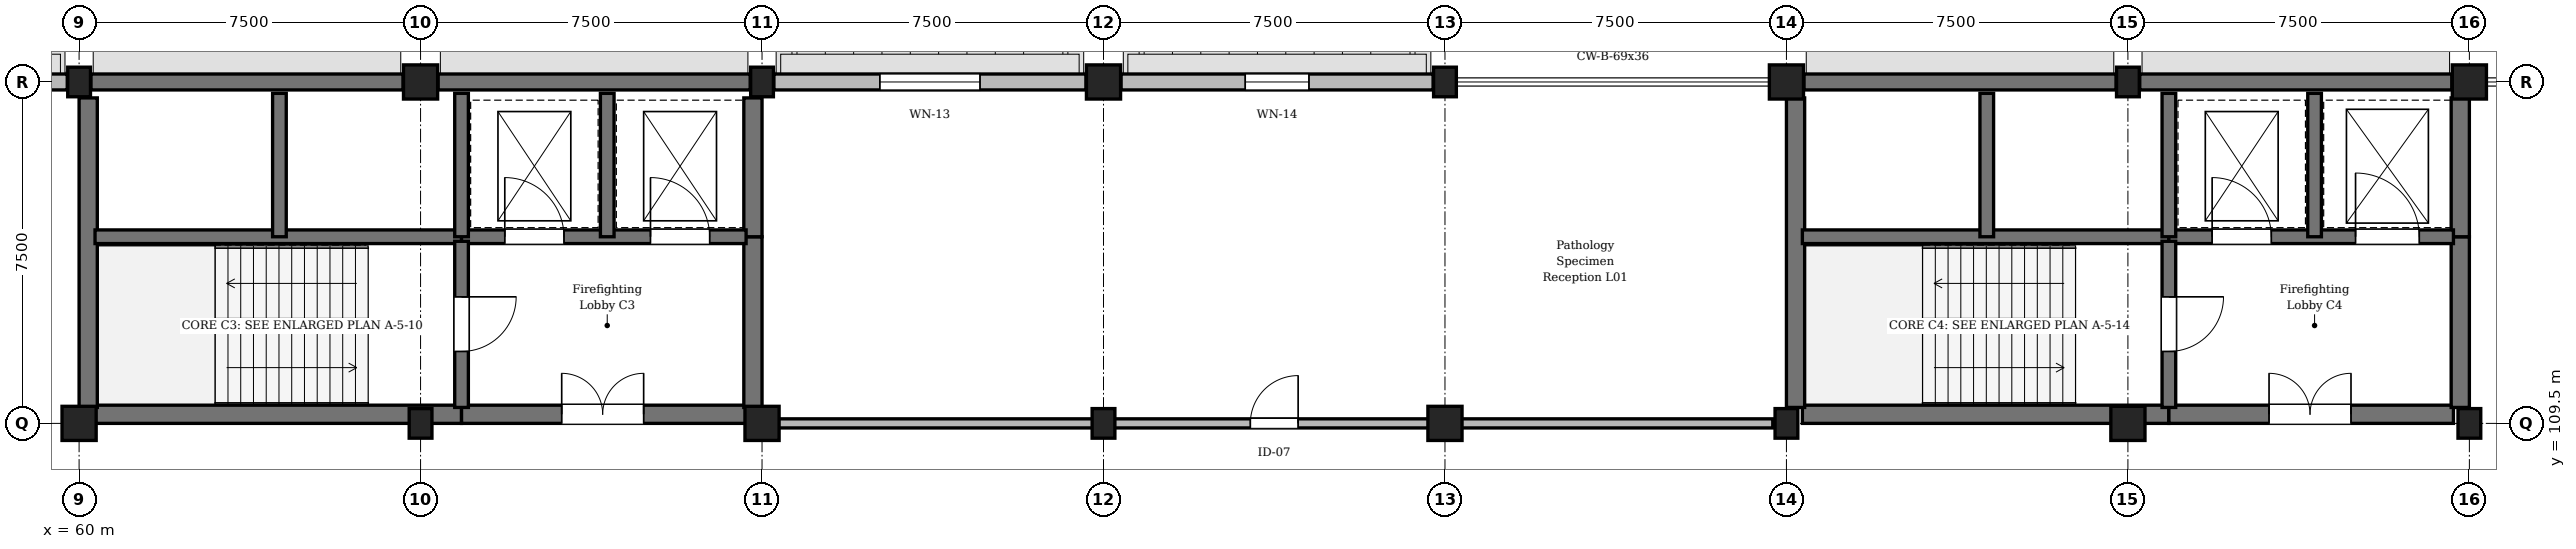
"""IFC4 building model, lengths in metres.
Left out: names, types, materials, properties, quantities, classifications, styles, units other than length and angle.
Written with IfcOpenShell. Run it as: python <this file> out.ifc"""

import sys

from ifc_helpers import new_model, si_unit, direction, frame, frame_2d, origin, origin_2d, place, context, subcontext, project, spatial, rectangle, extrude, element, fill, save


model = new_model("IFC4")
c1 = context("Model", 3, precision=1e-05, world=origin(), true_north=direction((0.0, 1.0)))
c2 = subcontext(c1, "Body", "Model", "MODEL_VIEW")
j1 = project(units=[si_unit("LENGTHUNIT", "METRE"), si_unit("PLANEANGLEUNIT", "RADIAN")], contexts=[c1])
p1 = place(None, origin())
s1 = spatial("IfcSite", under=j1, at=p1, CompositionType="ELEMENT")
p2 = place(p1, origin())
s2 = spatial("IfcBuilding", under=s1, at=p2, CompositionType="ELEMENT")
p3 = place(p2, frame((0.0, 0.0, 4.8)))
s3 = spatial("IfcBuildingStorey", under=s2, at=p3, CompositionType="ELEMENT", Elevation=4.8)
p4 = place(p3, frame((60.0, 109.5, 0.0), z_axis=(0.0, 0.0, 1.0), x_axis=(1.0, 0.0, 0.0)))
e1 = element("IfcColumn", 1, at=p4, inside=s3, PredefinedType="COLUMN", context=c2, shape_type="SweptSolid", body=[
    extrude(rectangle(XDim=0.75, YDim=0.75, at=origin_2d()), origin(), (0.0, 0.0, 1.0), 4.5),
])
for number, where, z_axis, x_axis in (
    (2, (60.0, 117.0, 0.0), (0.0, 0.0, 1.0), (1.0, 0.0, 0.0)),
    (3, (67.5, 109.5, 0.0), (0.0, 0.0, 1.0), (1.0, 0.0, 0.0)),
):
    element("IfcColumn", number, at=place(p3, frame(where, z_axis=z_axis, x_axis=x_axis)), inside=s3, PredefinedType="COLUMN", context=c2, shape_type="SweptSolid", body=[
        extrude(rectangle(XDim=0.5, YDim=0.65, at=origin_2d()), origin(), (0.0, 0.0, 1.0), 4.5),
    ])
for number, where, z_axis, x_axis in (
    (4, (67.5, 117.0, 0.0), (0.0, 0.0, 1.0), (1.0, 0.0, 0.0)),
    (5, (75.0, 109.5, 0.0), (0.0, 0.0, 1.0), (1.0, 0.0, 0.0)),
):
    element("IfcColumn", number, at=place(p3, frame(where, z_axis=z_axis, x_axis=x_axis)), inside=s3, PredefinedType="COLUMN", context=c2, shape_type="SweptSolid", body=[
        extrude(rectangle(XDim=0.75, YDim=0.75, at=origin_2d()), origin(), (0.0, 0.0, 1.0), 4.5),
    ])
for number, where, z_axis, x_axis in (
    (6, (75.0, 117.0, 0.0), (0.0, 0.0, 1.0), (1.0, 0.0, 0.0)),
    (7, (82.5, 109.5, 0.0), (0.0, 0.0, 1.0), (1.0, 0.0, 0.0)),
):
    element("IfcColumn", number, at=place(p3, frame(where, z_axis=z_axis, x_axis=x_axis)), inside=s3, PredefinedType="COLUMN", context=c2, shape_type="SweptSolid", body=[
        extrude(rectangle(XDim=0.5, YDim=0.65, at=origin_2d()), origin(), (0.0, 0.0, 1.0), 4.5),
    ])
for number, where, z_axis, x_axis in (
    (8, (82.5, 117.0, 0.0), (0.0, 0.0, 1.0), (1.0, 0.0, 0.0)),
    (9, (90.0, 109.5, 0.0), (0.0, 0.0, 1.0), (1.0, 0.0, 0.0)),
):
    element("IfcColumn", number, at=place(p3, frame(where, z_axis=z_axis, x_axis=x_axis)), inside=s3, PredefinedType="COLUMN", context=c2, shape_type="SweptSolid", body=[
        extrude(rectangle(XDim=0.75, YDim=0.75, at=origin_2d()), origin(), (0.0, 0.0, 1.0), 4.5),
    ])
for number, where, z_axis, x_axis in (
    (10, (90.0, 117.0, 0.0), (0.0, 0.0, 1.0), (1.0, 0.0, 0.0)),
    (11, (97.5, 109.5, 0.0), (0.0, 0.0, 1.0), (1.0, 0.0, 0.0)),
):
    element("IfcColumn", number, at=place(p3, frame(where, z_axis=z_axis, x_axis=x_axis)), inside=s3, PredefinedType="COLUMN", context=c2, shape_type="SweptSolid", body=[
        extrude(rectangle(XDim=0.5, YDim=0.65, at=origin_2d()), origin(), (0.0, 0.0, 1.0), 4.5),
    ])
for number, where, z_axis, x_axis in (
    (12, (97.5, 117.0, 0.0), (0.0, 0.0, 1.0), (1.0, 0.0, 0.0)),
    (13, (105.0, 109.5, 0.0), (0.0, 0.0, 1.0), (1.0, 0.0, 0.0)),
):
    element("IfcColumn", number, at=place(p3, frame(where, z_axis=z_axis, x_axis=x_axis)), inside=s3, PredefinedType="COLUMN", context=c2, shape_type="SweptSolid", body=[
        extrude(rectangle(XDim=0.75, YDim=0.75, at=origin_2d()), origin(), (0.0, 0.0, 1.0), 4.5),
    ])
for number, where, z_axis, x_axis in (
    (14, (105.0, 117.0, 0.0), (0.0, 0.0, 1.0), (1.0, 0.0, 0.0)),
    (15, (112.5, 109.5, 0.0), (0.0, 0.0, 1.0), (1.0, 0.0, 0.0)),
):
    element("IfcColumn", number, at=place(p3, frame(where, z_axis=z_axis, x_axis=x_axis)), inside=s3, PredefinedType="COLUMN", context=c2, shape_type="SweptSolid", body=[
        extrude(rectangle(XDim=0.5, YDim=0.65, at=origin_2d()), origin(), (0.0, 0.0, 1.0), 4.5),
    ])
p5 = place(p3, frame((112.5, 117.0, 0.0), z_axis=(0.0, 0.0, 1.0), x_axis=(1.0, 0.0, 0.0)))
e16 = element("IfcColumn", 16, at=p5, inside=s3, PredefinedType="COLUMN", context=c2, shape_type="SweptSolid", body=[
    extrude(rectangle(XDim=0.75, YDim=0.75, at=origin_2d()), origin(), (0.0, 0.0, 1.0), 4.5),
])
p6 = place(p3, frame((52.86, 117.0, 0.0), z_axis=(0.0, 0.0, 1.0), x_axis=(1.0, 0.0, 0.0)))
e17 = element("IfcWall", 17, at=p6, inside=s3, PredefinedType="STANDARD", context=c2, shape_type="SweptSolid", body=[
    extrude(rectangle(XDim=6.88, YDim=0.35, at=frame_2d((3.44, 0.0))), origin(), (0.0, 0.0, 1.0), 3.63),
])
p7 = place(p6, frame((2.64, 0.0, 0.9)))
e18 = element("IfcOpeningElement", 18, at=p7, cuts=e17, PredefinedType="OPENING", context=c2, shape_type="SweptSolid", body=[
    extrude(rectangle(XDim=1.6, YDim=1.95, at=frame_2d((0.8, 0.975))), frame((0.0, 0.185, 0.0), z_axis=(0.0, -1.0, 0.0), x_axis=(1.0, 0.0, 0.0)), (0.0, 0.0, 1.0), 0.37),
])
for number, where, z_axis, x_axis in (
    (19, (60.26, 117.0, 0.0), (0.0, 0.0, 1.0), (1.0, 0.0, 0.0)),
    (20, (67.885, 117.0, 0.0), (0.0, 0.0, 1.0), (1.0, 0.0, 0.0)),
):
    element("IfcWall", number, at=place(p3, frame(where, z_axis=z_axis, x_axis=x_axis)), inside=s3, PredefinedType="SHEAR", context=c2, shape_type="SweptSolid", body=[
        extrude(rectangle(XDim=6.855, YDim=0.35, at=frame_2d((3.427, 0.0))), origin(), (0.0, 0.0, 1.0), 4.18),
    ])
p8 = place(p3, frame((75.26, 117.0, 0.0), z_axis=(0.0, 0.0, 1.0), x_axis=(1.0, 0.0, 0.0)))
e21 = element("IfcWall", 21, at=p8, inside=s3, PredefinedType="STANDARD", context=c2, shape_type="SweptSolid", body=[
    extrude(rectangle(XDim=6.855, YDim=0.35, at=frame_2d((3.427, 0.0))), origin(), (0.0, 0.0, 1.0), 3.63),
])
p9 = place(p8, frame((2.327, 0.0, 0.9)))
e22 = element("IfcOpeningElement", 22, at=p9, cuts=e21, PredefinedType="OPENING", context=c2, shape_type="SweptSolid", body=[
    extrude(rectangle(XDim=2.2, YDim=1.95, at=frame_2d((1.1, 0.975))), frame((0.0, 0.185, 0.0), z_axis=(0.0, -1.0, 0.0), x_axis=(1.0, 0.0, 0.0)), (0.0, 0.0, 1.0), 0.37),
])
p10 = place(p3, frame((82.885, 117.0, 0.0), z_axis=(0.0, 0.0, 1.0), x_axis=(1.0, 0.0, 0.0)))
e23 = element("IfcWall", 23, at=p10, inside=s3, PredefinedType="STANDARD", context=c2, shape_type="SweptSolid", body=[
    extrude(rectangle(XDim=6.855, YDim=0.35, at=frame_2d((3.427, 0.0))), origin(), (0.0, 0.0, 1.0), 3.63),
])
p11 = place(p10, frame((2.728, 0.0, 0.9)))
e24 = element("IfcOpeningElement", 24, at=p11, cuts=e23, PredefinedType="OPENING", context=c2, shape_type="SweptSolid", body=[
    extrude(rectangle(XDim=1.4, YDim=1.8, at=frame_2d((0.7, 0.9))), frame((0.0, 0.185, 0.0), z_axis=(0.0, -1.0, 0.0), x_axis=(1.0, 0.0, 0.0)), (0.0, 0.0, 1.0), 0.37),
])
for number, where, z_axis, x_axis in (
    (25, (97.885, 117.0, 0.0), (0.0, 0.0, 1.0), (1.0, 0.0, 0.0)),
    (26, (105.26, 117.0, 0.0), (0.0, 0.0, 1.0), (1.0, 0.0, 0.0)),
):
    element("IfcWall", number, at=place(p3, frame(where, z_axis=z_axis, x_axis=x_axis)), inside=s3, PredefinedType="SHEAR", context=c2, shape_type="SweptSolid", body=[
        extrude(rectangle(XDim=6.855, YDim=0.35, at=frame_2d((3.427, 0.0))), origin(), (0.0, 0.0, 1.0), 4.18),
    ])
p12 = place(p3, frame((60.35, 109.7, 0.0), z_axis=(0.0, 0.0, 1.0), x_axis=(1.0, 0.0, 0.0)))
e27 = element("IfcWall", 27, at=p12, inside=s3, PredefinedType="SHEAR", context=c2, shape_type="SweptSolid", body=[
    extrude(rectangle(XDim=8.05, YDim=0.4, at=frame_2d((4.025, 0.0))), origin(), (0.0, 0.0, 1.0), 4.18),
])
p13 = place(p3, frame((68.4, 109.7, 0.0), z_axis=(0.0, 0.0, 1.0), x_axis=(1.0, 0.0, 0.0)))
e28 = element("IfcWall", 28, at=p13, inside=s3, PredefinedType="SHEAR", context=c2, shape_type="SweptSolid", body=[
    extrude(rectangle(XDim=6.25, YDim=0.4, at=frame_2d((3.125, 0.0))), origin(), (0.0, 0.0, 1.0), 4.18),
])
p14 = place(p13, frame((2.2, 0.0, 0.0)))
e29 = element("IfcOpeningElement", 29, at=p14, cuts=e28, PredefinedType="OPENING", context=c2, shape_type="SweptSolid", body=[
    extrude(rectangle(XDim=1.8, YDim=2.25, at=frame_2d((0.9, 1.125))), frame((0.0, 0.21, 0.0), z_axis=(0.0, -1.0, 0.0), x_axis=(1.0, 0.0, 0.0)), (0.0, 0.0, 1.0), 0.42),
])
p15 = place(p3, frame((60.2, 109.85, 0.0), z_axis=(0.0, 0.0, 1.0), x_axis=(0.0, 1.0, 0.0)))
e30 = element("IfcWall", 30, at=p15, inside=s3, PredefinedType="SHEAR", context=c2, shape_type="SweptSolid", body=[
    extrude(rectangle(XDim=6.8, YDim=0.4, at=frame_2d((3.4, 0.0))), origin(), (0.0, 0.0, 1.0), 4.18),
])
p16 = place(p3, frame((74.8, 109.85, 0.0), z_axis=(0.0, 0.0, 1.0), x_axis=(0.0, 1.0, 0.0)))
e31 = element("IfcWall", 31, at=p16, inside=s3, PredefinedType="SHEAR", context=c2, shape_type="SweptSolid", body=[
    extrude(rectangle(XDim=3.75, YDim=0.4, at=frame_2d((1.875, 0.0))), origin(), (0.0, 0.0, 1.0), 4.18),
])
p17 = place(p3, frame((74.8, 113.6, 0.0), z_axis=(0.0, 0.0, 1.0), x_axis=(0.0, 1.0, 0.0)))
e32 = element("IfcWall", 32, at=p17, inside=s3, PredefinedType="SHEAR", context=c2, shape_type="SweptSolid", body=[
    extrude(rectangle(XDim=3.05, YDim=0.4, at=frame_2d((1.525, 0.0))), origin(), (0.0, 0.0, 1.0), 4.18),
])
p18 = place(p3, frame((60.35, 113.6, 0.0), z_axis=(0.0, 0.0, 1.0), x_axis=(1.0, 0.0, 0.0)))
e33 = element("IfcWall", 33, at=p18, inside=s3, PredefinedType="SHEAR", context=c2, shape_type="SweptSolid", body=[
    extrude(rectangle(XDim=8.05, YDim=0.3, at=frame_2d((4.025, 0.0))), origin(), (0.0, 0.0, 1.0), 4.18),
])
p19 = place(p3, frame((68.4, 113.6, 0.0), z_axis=(0.0, 0.0, 1.0), x_axis=(1.0, 0.0, 0.0)))
e34 = element("IfcWall", 34, at=p19, inside=s3, PredefinedType="SHEAR", context=c2, shape_type="SweptSolid", body=[
    extrude(rectangle(XDim=6.25, YDim=0.3, at=frame_2d((3.125, 0.0))), origin(), (0.0, 0.0, 1.0), 4.18),
])
p20 = place(p19, frame((0.95, 0.0, 0.0)))
e35 = element("IfcOpeningElement", 35, at=p20, cuts=e34, PredefinedType="OPENING", context=c2, shape_type="SweptSolid", body=[
    extrude(rectangle(XDim=1.3, YDim=2.2, at=frame_2d((0.65, 1.1))), frame((0.0, 0.16, 0.0), z_axis=(0.0, -1.0, 0.0), x_axis=(1.0, 0.0, 0.0)), (0.0, 0.0, 1.0), 0.32),
])
p21 = place(p19, frame((4.15, 0.0, 0.0)))
e36 = element("IfcOpeningElement", 36, at=p21, cuts=e34, PredefinedType="OPENING", context=c2, shape_type="SweptSolid", body=[
    extrude(rectangle(XDim=1.3, YDim=2.2, at=frame_2d((0.65, 1.1))), frame((0.0, 0.16, 0.0), z_axis=(0.0, -1.0, 0.0), x_axis=(1.0, 0.0, 0.0)), (0.0, 0.0, 1.0), 0.32),
])
p22 = place(p3, frame((68.4, 113.5, 0.0), z_axis=(0.0, 0.0, 1.0), x_axis=(0.0, -1.0, 0.0)))
e37 = element("IfcWall", 37, at=p22, inside=s3, PredefinedType="SHEAR", context=c2, shape_type="SweptSolid", body=[
    extrude(rectangle(XDim=3.65, YDim=0.3, at=frame_2d((1.825, 0.0))), origin(), (0.0, 0.0, 1.0), 4.18),
])
p23 = place(p22, frame((1.22, 0.0, 0.0)))
e38 = element("IfcOpeningElement", 38, at=p23, cuts=e37, PredefinedType="OPENING", context=c2, shape_type="SweptSolid", body=[
    extrude(rectangle(XDim=1.2, YDim=2.25, at=frame_2d((0.6, 1.125))), frame((0.0, 0.16, 0.0), z_axis=(0.0, -1.0, 0.0), x_axis=(1.0, 0.0, 0.0)), (0.0, 0.0, 1.0), 0.32),
])
for number, where, z_axis, x_axis in (
    (39, (64.4, 113.6, 0.0), (0.0, 0.0, 1.0), (0.0, 1.0, 0.0)),
    (40, (68.4, 113.6, 0.0), (0.0, 0.0, 1.0), (0.0, 1.0, 0.0)),
    (41, (71.6, 113.6, 0.0), (0.0, 0.0, 1.0), (0.0, 1.0, 0.0)),
):
    element("IfcWall", number, at=place(p3, frame(where, z_axis=z_axis, x_axis=x_axis)), inside=s3, PredefinedType="SHEAR", context=c2, shape_type="SweptSolid", body=[
        extrude(rectangle(XDim=3.15, YDim=0.3, at=frame_2d((1.575, 0.0))), origin(), (0.0, 0.0, 1.0), 4.18),
    ])
p24 = place(p3, frame((97.85, 109.7, 0.0), z_axis=(0.0, 0.0, 1.0), x_axis=(1.0, 0.0, 0.0)))
e42 = element("IfcWall", 42, at=p24, inside=s3, PredefinedType="SHEAR", context=c2, shape_type="SweptSolid", body=[
    extrude(rectangle(XDim=8.05, YDim=0.4, at=frame_2d((4.025, 0.0))), origin(), (0.0, 0.0, 1.0), 4.18),
])
p25 = place(p3, frame((105.9, 109.7, 0.0), z_axis=(0.0, 0.0, 1.0), x_axis=(1.0, 0.0, 0.0)))
e43 = element("IfcWall", 43, at=p25, inside=s3, PredefinedType="SHEAR", context=c2, shape_type="SweptSolid", body=[
    extrude(rectangle(XDim=6.25, YDim=0.4, at=frame_2d((3.125, 0.0))), origin(), (0.0, 0.0, 1.0), 4.18),
])
p26 = place(p25, frame((2.2, 0.0, 0.0)))
e44 = element("IfcOpeningElement", 44, at=p26, cuts=e43, PredefinedType="OPENING", context=c2, shape_type="SweptSolid", body=[
    extrude(rectangle(XDim=1.8, YDim=2.25, at=frame_2d((0.9, 1.125))), frame((0.0, 0.21, 0.0), z_axis=(0.0, -1.0, 0.0), x_axis=(1.0, 0.0, 0.0)), (0.0, 0.0, 1.0), 0.42),
])
p27 = place(p3, frame((97.7, 109.85, 0.0), z_axis=(0.0, 0.0, 1.0), x_axis=(0.0, 1.0, 0.0)))
e45 = element("IfcWall", 45, at=p27, inside=s3, PredefinedType="SHEAR", context=c2, shape_type="SweptSolid", body=[
    extrude(rectangle(XDim=6.8, YDim=0.4, at=frame_2d((3.4, 0.0))), origin(), (0.0, 0.0, 1.0), 4.18),
])
p28 = place(p3, frame((112.3, 109.85, 0.0), z_axis=(0.0, 0.0, 1.0), x_axis=(0.0, 1.0, 0.0)))
e46 = element("IfcWall", 46, at=p28, inside=s3, PredefinedType="SHEAR", context=c2, shape_type="SweptSolid", body=[
    extrude(rectangle(XDim=3.75, YDim=0.4, at=frame_2d((1.875, 0.0))), origin(), (0.0, 0.0, 1.0), 4.18),
])
p29 = place(p3, frame((112.3, 113.6, 0.0), z_axis=(0.0, 0.0, 1.0), x_axis=(0.0, 1.0, 0.0)))
e47 = element("IfcWall", 47, at=p29, inside=s3, PredefinedType="SHEAR", context=c2, shape_type="SweptSolid", body=[
    extrude(rectangle(XDim=3.05, YDim=0.4, at=frame_2d((1.525, 0.0))), origin(), (0.0, 0.0, 1.0), 4.18),
])
p30 = place(p3, frame((97.85, 113.6, 0.0), z_axis=(0.0, 0.0, 1.0), x_axis=(1.0, 0.0, 0.0)))
e48 = element("IfcWall", 48, at=p30, inside=s3, PredefinedType="SHEAR", context=c2, shape_type="SweptSolid", body=[
    extrude(rectangle(XDim=8.05, YDim=0.3, at=frame_2d((4.025, 0.0))), origin(), (0.0, 0.0, 1.0), 4.18),
])
p31 = place(p3, frame((105.9, 113.6, 0.0), z_axis=(0.0, 0.0, 1.0), x_axis=(1.0, 0.0, 0.0)))
e49 = element("IfcWall", 49, at=p31, inside=s3, PredefinedType="SHEAR", context=c2, shape_type="SweptSolid", body=[
    extrude(rectangle(XDim=6.25, YDim=0.3, at=frame_2d((3.125, 0.0))), origin(), (0.0, 0.0, 1.0), 4.18),
])
p32 = place(p31, frame((0.95, 0.0, 0.0)))
e50 = element("IfcOpeningElement", 50, at=p32, cuts=e49, PredefinedType="OPENING", context=c2, shape_type="SweptSolid", body=[
    extrude(rectangle(XDim=1.3, YDim=2.2, at=frame_2d((0.65, 1.1))), frame((0.0, 0.16, 0.0), z_axis=(0.0, -1.0, 0.0), x_axis=(1.0, 0.0, 0.0)), (0.0, 0.0, 1.0), 0.32),
])
p33 = place(p31, frame((4.1, 0.0, 0.0)))
e51 = element("IfcOpeningElement", 51, at=p33, cuts=e49, PredefinedType="OPENING", context=c2, shape_type="SweptSolid", body=[
    extrude(rectangle(XDim=1.4, YDim=2.25, at=frame_2d((0.7, 1.125))), frame((0.0, 0.16, 0.0), z_axis=(0.0, -1.0, 0.0), x_axis=(1.0, 0.0, 0.0)), (0.0, 0.0, 1.0), 0.32),
])
p34 = place(p3, frame((105.9, 113.5, 0.0), z_axis=(0.0, 0.0, 1.0), x_axis=(0.0, -1.0, 0.0)))
e52 = element("IfcWall", 52, at=p34, inside=s3, PredefinedType="SHEAR", context=c2, shape_type="SweptSolid", body=[
    extrude(rectangle(XDim=3.65, YDim=0.3, at=frame_2d((1.825, 0.0))), origin(), (0.0, 0.0, 1.0), 4.18),
])
p35 = place(p34, frame((1.22, 0.0, 0.0)))
e53 = element("IfcOpeningElement", 53, at=p35, cuts=e52, PredefinedType="OPENING", context=c2, shape_type="SweptSolid", body=[
    extrude(rectangle(XDim=1.2, YDim=2.25, at=frame_2d((0.6, 1.125))), frame((0.0, 0.16, 0.0), z_axis=(0.0, -1.0, 0.0), x_axis=(1.0, 0.0, 0.0)), (0.0, 0.0, 1.0), 0.32),
])
for number, where, z_axis, x_axis in (
    (54, (101.9, 113.6, 0.0), (0.0, 0.0, 1.0), (0.0, 1.0, 0.0)),
    (55, (105.9, 113.6, 0.0), (0.0, 0.0, 1.0), (0.0, 1.0, 0.0)),
    (56, (109.1, 113.6, 0.0), (0.0, 0.0, 1.0), (0.0, 1.0, 0.0)),
):
    element("IfcWall", number, at=place(p3, frame(where, z_axis=z_axis, x_axis=x_axis)), inside=s3, PredefinedType="SHEAR", context=c2, shape_type="SweptSolid", body=[
        extrude(rectangle(XDim=3.15, YDim=0.3, at=frame_2d((1.575, 0.0))), origin(), (0.0, 0.0, 1.0), 4.18),
    ])
p36 = place(p3, frame((75.3, 109.5, 0.0), z_axis=(0.0, 0.0, 1.0), x_axis=(1.0, 0.0, 0.0)))
e57 = element("IfcWall", 57, at=p36, inside=s3, PredefinedType="STANDARD", context=c2, shape_type="SweptSolid", body=[
    extrude(rectangle(XDim=21.9, YDim=0.2, at=frame_2d((10.95, 0.0))), origin(), (0.0, 0.0, 1.0), 3.515),
])
p37 = place(p36, frame((10.425, 0.0, 0.0)))
e58 = element("IfcOpeningElement", 58, at=p37, cuts=e57, PredefinedType="OPENING", context=c2, shape_type="SweptSolid", body=[
    extrude(rectangle(XDim=1.05, YDim=2.2, at=frame_2d((0.525, 1.1))), frame((0.0, 0.11, 0.0), z_axis=(0.0, -1.0, 0.0), x_axis=(1.0, 0.0, 0.0)), (0.0, 0.0, 1.0), 0.22),
])
p38 = place(p9, origin())
e59 = element("IfcWindow", 59, at=p38, inside=s3, PartitioningType="SINGLE_PANEL", PredefinedType="WINDOW", context=c2, shape_type="SweptSolid", body=[
    extrude(rectangle(XDim=2.2, YDim=1.95, at=frame_2d((1.1, 0.975))), frame((0.0, 0.03, 0.0), z_axis=(0.0, -1.0, 0.0), x_axis=(1.0, 0.0, 0.0)), (0.0, 0.0, 1.0), 0.06),
])
fill(e22, e59)
p39 = place(p11, origin())
e60 = element("IfcWindow", 60, at=p39, inside=s3, PartitioningType="SINGLE_PANEL", PredefinedType="WINDOW", context=c2, shape_type="SweptSolid", body=[
    extrude(rectangle(XDim=1.4, YDim=1.8, at=frame_2d((0.7, 0.9))), frame((0.0, 0.03, 0.0), z_axis=(0.0, -1.0, 0.0), x_axis=(1.0, 0.0, 0.0)), (0.0, 0.0, 1.0), 0.06),
])
fill(e24, e60)
p40 = place(p14, origin())
e61 = element("IfcDoor", 61, at=p40, inside=s3, OperationType="DOUBLE_DOOR_SINGLE_SWING", PredefinedType="DOOR", context=c2, shape_type="SweptSolid", body=[
    extrude(rectangle(XDim=1.8, YDim=2.25, at=frame_2d((0.9, 1.125))), frame((0.0, 0.025, 0.0), z_axis=(0.0, -1.0, 0.0), x_axis=(1.0, 0.0, 0.0)), (0.0, 0.0, 1.0), 0.05),
])
fill(e29, e61)
p41 = place(p20, origin())
e62 = element("IfcDoor", 62, at=p41, inside=s3, OperationType="DOUBLE_DOOR_SLIDING", PredefinedType="DOOR", context=c2, shape_type="SweptSolid", body=[
    extrude(rectangle(XDim=1.3, YDim=2.2, at=frame_2d((0.65, 1.1))), frame((0.0, 0.025, 0.0), z_axis=(0.0, -1.0, 0.0), x_axis=(1.0, 0.0, 0.0)), (0.0, 0.0, 1.0), 0.05),
])
fill(e35, e62)
p42 = place(p21, origin())
e63 = element("IfcDoor", 63, at=p42, inside=s3, OperationType="DOUBLE_DOOR_SLIDING", PredefinedType="DOOR", context=c2, shape_type="SweptSolid", body=[
    extrude(rectangle(XDim=1.3, YDim=2.2, at=frame_2d((0.65, 1.1))), frame((0.0, 0.025, 0.0), z_axis=(0.0, -1.0, 0.0), x_axis=(1.0, 0.0, 0.0)), (0.0, 0.0, 1.0), 0.05),
])
fill(e36, e63)
p43 = place(p23, origin())
e64 = element("IfcDoor", 64, at=p43, inside=s3, OperationType="SINGLE_SWING_LEFT", PredefinedType="DOOR", context=c2, shape_type="SweptSolid", body=[
    extrude(rectangle(XDim=1.2, YDim=2.25, at=frame_2d((0.6, 1.125))), frame((0.0, 0.025, 0.0), z_axis=(0.0, -1.0, 0.0), x_axis=(1.0, 0.0, 0.0)), (0.0, 0.0, 1.0), 0.05),
])
fill(e38, e64)
p44 = place(p26, origin())
e65 = element("IfcDoor", 65, at=p44, inside=s3, OperationType="DOUBLE_DOOR_SINGLE_SWING", PredefinedType="DOOR", context=c2, shape_type="SweptSolid", body=[
    extrude(rectangle(XDim=1.8, YDim=2.25, at=frame_2d((0.9, 1.125))), frame((0.0, 0.025, 0.0), z_axis=(0.0, -1.0, 0.0), x_axis=(1.0, 0.0, 0.0)), (0.0, 0.0, 1.0), 0.05),
])
fill(e44, e65)
p45 = place(p32, origin())
e66 = element("IfcDoor", 66, at=p45, inside=s3, OperationType="DOUBLE_DOOR_SLIDING", PredefinedType="DOOR", context=c2, shape_type="SweptSolid", body=[
    extrude(rectangle(XDim=1.3, YDim=2.2, at=frame_2d((0.65, 1.1))), frame((0.0, 0.025, 0.0), z_axis=(0.0, -1.0, 0.0), x_axis=(1.0, 0.0, 0.0)), (0.0, 0.0, 1.0), 0.05),
])
fill(e50, e66)
p46 = place(p33, origin())
e67 = element("IfcDoor", 67, at=p46, inside=s3, OperationType="DOUBLE_DOOR_SLIDING", PredefinedType="DOOR", context=c2, shape_type="SweptSolid", body=[
    extrude(rectangle(XDim=1.4, YDim=2.25, at=frame_2d((0.7, 1.125))), frame((0.0, 0.025, 0.0), z_axis=(0.0, -1.0, 0.0), x_axis=(1.0, 0.0, 0.0)), (0.0, 0.0, 1.0), 0.05),
])
fill(e51, e67)
p47 = place(p35, origin())
e68 = element("IfcDoor", 68, at=p47, inside=s3, OperationType="SINGLE_SWING_LEFT", PredefinedType="DOOR", context=c2, shape_type="SweptSolid", body=[
    extrude(rectangle(XDim=1.2, YDim=2.25, at=frame_2d((0.6, 1.125))), frame((0.0, 0.025, 0.0), z_axis=(0.0, -1.0, 0.0), x_axis=(1.0, 0.0, 0.0)), (0.0, 0.0, 1.0), 0.05),
])
fill(e53, e68)
p48 = place(p37, origin())
e69 = element("IfcDoor", 69, at=p48, inside=s3, OperationType="SINGLE_SWING_RIGHT", PredefinedType="DOOR", context=c2, shape_type="SweptSolid", body=[
    extrude(rectangle(XDim=1.05, YDim=2.2, at=frame_2d((0.525, 1.1))), frame((0.0, 0.025, 0.0), z_axis=(0.0, -1.0, 0.0), x_axis=(1.0, 0.0, 0.0)), (0.0, 0.0, 1.0), 0.05),
])
fill(e58, e69)
save(model, sys.argv[1])
